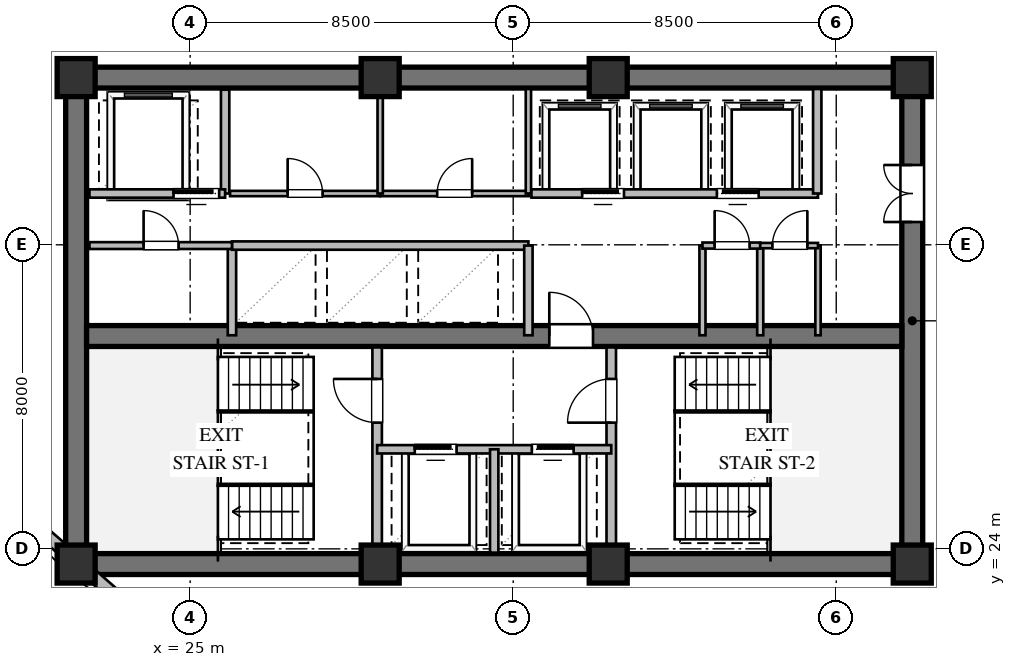
"""IFC4 building model, lengths in metres.
Left out: names, types, materials, properties, quantities, classifications, styles, units other than length and angle.
Written with IfcOpenShell. Run it as: python <this file> out.ifc"""

import sys

from ifc_helpers import new_model, si_unit, direction, frame, frame_2d, origin, origin_2d, place, context, subcontext, project, spatial, rectangle, extrude, element, fill, save


model = new_model("IFC4")
c1 = context("Model", 3, precision=1e-05, world=origin(), true_north=direction((0.0, 1.0)))
c2 = subcontext(c1, "Body", "Model", "MODEL_VIEW")
j1 = project(units=[si_unit("LENGTHUNIT", "METRE"), si_unit("PLANEANGLEUNIT", "RADIAN")], contexts=[c1])
p1 = place(None, origin())
s1 = spatial("IfcSite", under=j1, at=p1, CompositionType="ELEMENT")
p2 = place(p1, origin())
s2 = spatial("IfcBuilding", under=s1, at=p2, CompositionType="ELEMENT")
p3 = place(p2, frame((0.0, 0.0, 117.0)))
s3 = spatial("IfcBuildingStorey", under=s2, at=p3, CompositionType="ELEMENT", Elevation=117.0)
for number, where, z_axis, x_axis in (
    (1, (21.725, 23.6, 0.0), (0.0, 0.0, 1.0), (1.0, 0.0, 0.0)),
    (2, (21.725, 36.4, 0.0), (0.0, 0.0, 1.0), (1.0, 0.0, 0.0)),
):
    element("IfcWall", number, at=place(p3, frame(where, z_axis=z_axis, x_axis=x_axis)), inside=s3, PredefinedType="SHEAR", context=c2, shape_type="SweptSolid", body=[
        extrude(rectangle(XDim=22.55, YDim=0.55, at=frame_2d((11.275, 0.0))), origin(), (0.0, 0.0, 1.0), 3.36),
    ])
p4 = place(p3, frame((22.0, 23.875, 0.0), z_axis=(0.0, 0.0, 1.0), x_axis=(0.0, 1.0, 0.0)))
e3 = element("IfcWall", 3, at=p4, inside=s3, PredefinedType="SHEAR", context=c2, shape_type="SweptSolid", body=[
    extrude(rectangle(XDim=12.25, YDim=0.55, at=frame_2d((6.125, 0.0))), origin(), (0.0, 0.0, 1.0), 3.36),
])
p5 = place(p3, frame((44.0, 23.875, 0.0), z_axis=(0.0, 0.0, 1.0), x_axis=(0.0, 1.0, 0.0)))
e4 = element("IfcWall", 4, at=p5, inside=s3, PredefinedType="SHEAR", context=c2, shape_type="SweptSolid", body=[
    extrude(rectangle(XDim=12.25, YDim=0.55, at=frame_2d((6.125, 0.0))), origin(), (0.0, 0.0, 1.0), 3.36),
])
p6 = place(p5, frame((8.725, 0.0, 0.0)))
e5 = element("IfcOpeningElement", 5, at=p6, cuts=e4, PredefinedType="OPENING", context=c2, shape_type="SweptSolid", body=[
    extrude(rectangle(XDim=1.5, YDim=2.15, at=frame_2d((0.75, 1.075))), frame((0.0, 0.285, 0.0), z_axis=(0.0, -1.0, 0.0), x_axis=(1.0, 0.0, 0.0)), (0.0, 0.0, 1.0), 0.57),
])
p7 = place(p3, frame((22.275, 29.6, 0.0), z_axis=(0.0, 0.0, 1.0), x_axis=(1.0, 0.0, 0.0)))
e6 = element("IfcWall", 6, at=p7, inside=s3, PredefinedType="SHEAR", context=c2, shape_type="SweptSolid", body=[
    extrude(rectangle(XDim=21.45, YDim=0.55, at=frame_2d((10.725, 0.0))), origin(), (0.0, 0.0, 1.0), 3.36),
])
p8 = place(p7, frame((12.175, 0.0, 0.0)))
e7 = element("IfcOpeningElement", 7, at=p8, cuts=e6, PredefinedType="OPENING", context=c2, shape_type="SweptSolid", body=[
    extrude(rectangle(XDim=1.15, YDim=2.1, at=frame_2d((0.575, 1.05))), frame((0.0, 0.285, 0.0), z_axis=(0.0, -1.0, 0.0), x_axis=(1.0, 0.0, 0.0)), (0.0, 0.0, 1.0), 0.57),
])
for number, where, z_axis, x_axis in (
    (8, (22.0, 23.6, 0.0), (0.0, 0.0, 1.0), (1.0, 0.0, 0.0)),
    (9, (30.0, 23.6, 0.0), (0.0, 0.0, 1.0), (1.0, 0.0, 0.0)),
    (10, (36.0, 23.6, 0.0), (0.0, 0.0, 1.0), (1.0, 0.0, 0.0)),
    (11, (44.0, 23.6, 0.0), (0.0, 0.0, 1.0), (1.0, 0.0, 0.0)),
    (12, (44.0, 36.4, 0.0), (0.0, 0.0, 1.0), (1.0, 0.0, 0.0)),
    (13, (36.0, 36.4, 0.0), (0.0, 0.0, 1.0), (1.0, 0.0, 0.0)),
    (14, (30.0, 36.4, 0.0), (0.0, 0.0, 1.0), (1.0, 0.0, 0.0)),
    (15, (22.0, 36.4, 0.0), (0.0, 0.0, 1.0), (1.0, 0.0, 0.0)),
):
    element("IfcColumn", number, at=place(p3, frame(where, z_axis=z_axis, x_axis=x_axis)), inside=s3, PredefinedType="COLUMN", context=c2, shape_type="SweptSolid", body=[
        extrude(rectangle(XDim=1.0, YDim=1.0, at=origin_2d()), origin(), (0.0, 0.0, 1.0), 3.6),
    ])
p9 = place(p3, frame((24.225, 21.727, 0.0), z_axis=(0.0, 0.0, 1.0), x_axis=(-0.753105964003, 0.657899237713, 0.0)))
e16 = element("IfcWall", 16, at=p9, inside=s3, PredefinedType="STANDARD", context=c2, shape_type="SweptSolid", body=[
    extrude(rectangle(XDim=5.998, YDim=0.32, at=frame_2d((2.999, 0.0))), origin(), (0.0, 0.0, 1.0), 2.35),
])
p10 = place(p3, frame((29.92, 23.9, 0.0), z_axis=(0.0, 0.0, 1.0), x_axis=(0.0, 1.0, 0.0)))
e17 = element("IfcWall", 17, at=p10, inside=s3, PredefinedType="SOLIDWALL", context=c2, shape_type="SweptSolid", body=[
    extrude(rectangle(XDim=5.4, YDim=0.25, at=frame_2d((2.7, 0.0))), origin(), (0.0, 0.0, 1.0), 2.806),
])
p11 = place(p10, frame((3.421, 0.0, 0.0)))
e18 = element("IfcOpeningElement", 18, at=p11, cuts=e17, PredefinedType="OPENING", context=c2, shape_type="SweptSolid", body=[
    extrude(rectangle(XDim=1.15, YDim=2.1, at=frame_2d((0.575, 1.05))), frame((0.0, 0.135, 0.0), z_axis=(0.0, -1.0, 0.0), x_axis=(1.0, 0.0, 0.0)), (0.0, 0.0, 1.0), 0.27),
])
p12 = place(p3, frame((36.08, 23.9, 0.0), z_axis=(0.0, 0.0, 1.0), x_axis=(0.0, 1.0, 0.0)))
e19 = element("IfcWall", 19, at=p12, inside=s3, PredefinedType="SOLIDWALL", context=c2, shape_type="SweptSolid", body=[
    extrude(rectangle(XDim=5.4, YDim=0.25, at=frame_2d((2.7, 0.0))), origin(), (0.0, 0.0, 1.0), 3.36),
])
p13 = place(p12, frame((3.421, 0.0, 0.0)))
e20 = element("IfcOpeningElement", 20, at=p13, cuts=e19, PredefinedType="OPENING", context=c2, shape_type="SweptSolid", body=[
    extrude(rectangle(XDim=1.15, YDim=2.1, at=frame_2d((0.575, 1.05))), frame((0.0, 0.135, 0.0), z_axis=(0.0, -1.0, 0.0), x_axis=(1.0, 0.0, 0.0)), (0.0, 0.0, 1.0), 0.27),
])
p14 = place(p3, frame((29.92, 26.62, 0.0), z_axis=(0.0, 0.0, 1.0), x_axis=(1.0, 0.0, 0.0)))
e21 = element("IfcWall", 21, at=p14, inside=s3, PredefinedType="SOLIDWALL", context=c2, shape_type="SweptSolid", body=[
    extrude(rectangle(XDim=6.16, YDim=0.22, at=frame_2d((3.08, 0.0))), origin(), (0.0, 0.0, 1.0), 3.36),
])
p15 = place(p14, frame((0.99, 0.0, 0.0)))
e22 = element("IfcOpeningElement", 22, at=p15, cuts=e21, PredefinedType="OPENING", context=c2, shape_type="SweptSolid", body=[
    extrude(rectangle(XDim=1.1, YDim=2.1, at=frame_2d((0.55, 1.05))), frame((0.0, 0.12, 0.0), z_axis=(0.0, -1.0, 0.0), x_axis=(1.0, 0.0, 0.0)), (0.0, 0.0, 1.0), 0.24),
])
p16 = place(p14, frame((4.07, 0.0, 0.0)))
e23 = element("IfcOpeningElement", 23, at=p16, cuts=e21, PredefinedType="OPENING", context=c2, shape_type="SweptSolid", body=[
    extrude(rectangle(XDim=1.1, YDim=2.1, at=frame_2d((0.55, 1.05))), frame((0.0, 0.12, 0.0), z_axis=(0.0, -1.0, 0.0), x_axis=(1.0, 0.0, 0.0)), (0.0, 0.0, 1.0), 0.24),
])
p17 = place(p3, frame((33.0, 23.9, 0.0), z_axis=(0.0, 0.0, 1.0), x_axis=(0.0, 1.0, 0.0)))
e24 = element("IfcWall", 24, at=p17, inside=s3, PredefinedType="SOLIDWALL", context=c2, shape_type="SweptSolid", body=[
    extrude(rectangle(XDim=2.72, YDim=0.22, at=frame_2d((1.36, 0.0))), origin(), (0.0, 0.0, 1.0), 3.36),
])
p18 = place(p3, frame((25.92, 33.35, 0.0), z_axis=(0.0, 0.0, 1.0), x_axis=(0.0, 1.0, 0.0)))
e25 = element("IfcWall", 25, at=p18, inside=s3, PredefinedType="SOLIDWALL", context=c2, shape_type="SweptSolid", body=[
    extrude(rectangle(XDim=2.73, YDim=0.22, at=frame_2d((1.365, 0.0))), origin(), (0.0, 0.0, 1.0), 3.36),
])
p19 = place(p3, frame((22.35, 33.35, 0.0), z_axis=(0.0, 0.0, 1.0), x_axis=(1.0, 0.0, 0.0)))
e26 = element("IfcWall", 26, at=p19, inside=s3, PredefinedType="SOLIDWALL", context=c2, shape_type="SweptSolid", body=[
    extrude(rectangle(XDim=3.57, YDim=0.22, at=frame_2d((1.785, 0.0))), origin(), (0.0, 0.0, 1.0), 3.36),
])
p20 = place(p19, frame((2.213, 0.0, 0.0)))
e27 = element("IfcOpeningElement", 27, at=p20, cuts=e26, PredefinedType="OPENING", context=c2, shape_type="SweptSolid", body=[
    extrude(rectangle(XDim=1.2, YDim=2.1, at=frame_2d((0.6, 1.05))), frame((0.0, 0.12, 0.0), z_axis=(0.0, -1.0, 0.0), x_axis=(1.0, 0.0, 0.0)), (0.0, 0.0, 1.0), 0.24),
])
p21 = place(p3, frame((26.1, 29.62, 0.0), z_axis=(0.0, 0.0, 1.0), x_axis=(0.0, 1.0, 0.0)))
e28 = element("IfcWall", 28, at=p21, inside=s3, PredefinedType="SOLIDWALL", context=c2, shape_type="SweptSolid", body=[
    extrude(rectangle(XDim=2.36, YDim=0.22, at=frame_2d((1.18, 0.0))), origin(), (0.0, 0.0, 1.0), 3.36),
])
p22 = place(p3, frame((26.1, 31.98, 0.0), z_axis=(0.0, 0.0, 1.0), x_axis=(1.0, 0.0, 0.0)))
e29 = element("IfcWall", 29, at=p22, inside=s3, PredefinedType="SOLIDWALL", context=c2, shape_type="SweptSolid", body=[
    extrude(rectangle(XDim=7.8, YDim=0.22, at=frame_2d((3.9, 0.0))), origin(), (0.0, 0.0, 1.0), 3.36),
])
p23 = place(p3, frame((33.9, 29.62, 0.0), z_axis=(0.0, 0.0, 1.0), x_axis=(0.0, 1.0, 0.0)))
e30 = element("IfcWall", 30, at=p23, inside=s3, PredefinedType="SOLIDWALL", context=c2, shape_type="SweptSolid", body=[
    extrude(rectangle(XDim=2.36, YDim=0.22, at=frame_2d((1.18, 0.0))), origin(), (0.0, 0.0, 1.0), 3.36),
])
p24 = place(p3, frame((26.05, 33.35, 0.0), z_axis=(0.0, 0.0, 1.0), x_axis=(1.0, 0.0, 0.0)))
e31 = element("IfcWall", 31, at=p24, inside=s3, PredefinedType="PARTITIONING", context=c2, shape_type="SweptSolid", body=[
    extrude(rectangle(XDim=3.95, YDim=0.14, at=frame_2d((1.975, 0.0))), origin(), (0.0, 0.0, 1.0), 3.36),
])
p25 = place(p24, frame((1.515, 0.0, 0.0)))
e32 = element("IfcOpeningElement", 32, at=p25, cuts=e31, PredefinedType="OPENING", context=c2, shape_type="SweptSolid", body=[
    extrude(rectangle(XDim=0.92, YDim=2.1, at=frame_2d((0.46, 1.05))), frame((0.0, 0.08, 0.0), z_axis=(0.0, -1.0, 0.0), x_axis=(1.0, 0.0, 0.0)), (0.0, 0.0, 1.0), 0.16),
])
p26 = place(p3, frame((30.0, 33.35, 0.0), z_axis=(0.0, 0.0, 1.0), x_axis=(1.0, 0.0, 0.0)))
e33 = element("IfcWall", 33, at=p26, inside=s3, PredefinedType="PARTITIONING", context=c2, shape_type="SweptSolid", body=[
    extrude(rectangle(XDim=3.92, YDim=0.14, at=frame_2d((1.96, 0.0))), origin(), (0.0, 0.0, 1.0), 3.36),
])
p27 = place(p26, frame((1.5, 0.0, 0.0)))
e34 = element("IfcOpeningElement", 34, at=p27, cuts=e33, PredefinedType="OPENING", context=c2, shape_type="SweptSolid", body=[
    extrude(rectangle(XDim=0.92, YDim=2.1, at=frame_2d((0.46, 1.05))), frame((0.0, 0.08, 0.0), z_axis=(0.0, -1.0, 0.0), x_axis=(1.0, 0.0, 0.0)), (0.0, 0.0, 1.0), 0.16),
])
for number, where, z_axis, x_axis in (
    (35, (30.0, 33.35, 0.0), (0.0, 0.0, 1.0), (0.0, 1.0, 0.0)),
    (36, (33.9, 33.35, 0.0), (0.0, 0.0, 1.0), (0.0, 1.0, 0.0)),
):
    element("IfcWall", number, at=place(p3, frame(where, z_axis=z_axis, x_axis=x_axis)), inside=s3, PredefinedType="PARTITIONING", context=c2, shape_type="SweptSolid", body=[
        extrude(rectangle(XDim=2.75, YDim=0.14, at=frame_2d((1.375, 0.0))), origin(), (0.0, 0.0, 1.0), 3.36),
    ])
p28 = place(p3, frame((33.98, 33.35, 0.0), z_axis=(0.0, 0.0, 1.0), x_axis=(1.0, 0.0, 0.0)))
e37 = element("IfcWall", 37, at=p28, inside=s3, PredefinedType="SOLIDWALL", context=c2, shape_type="SweptSolid", body=[
    extrude(rectangle(XDim=7.54, YDim=0.22, at=frame_2d((3.77, 0.0))), origin(), (0.0, 0.0, 1.0), 3.36),
])
p29 = place(p28, frame((1.335, 0.0, 0.0)))
e38 = element("IfcOpeningElement", 38, at=p29, cuts=e37, PredefinedType="OPENING", context=c2, shape_type="SweptSolid", body=[
    extrude(rectangle(XDim=1.1, YDim=2.1, at=frame_2d((0.55, 1.05))), frame((0.0, 0.12, 0.0), z_axis=(0.0, -1.0, 0.0), x_axis=(1.0, 0.0, 0.0)), (0.0, 0.0, 1.0), 0.24),
])
p30 = place(p28, frame((4.879, 0.0, 0.0)))
e39 = element("IfcOpeningElement", 39, at=p30, cuts=e37, PredefinedType="OPENING", context=c2, shape_type="SweptSolid", body=[
    extrude(rectangle(XDim=1.1, YDim=2.1, at=frame_2d((0.55, 1.05))), frame((0.0, 0.12, 0.0), z_axis=(0.0, -1.0, 0.0), x_axis=(1.0, 0.0, 0.0)), (0.0, 0.0, 1.0), 0.24),
])
p31 = place(p3, frame((41.5, 33.35, 0.0), z_axis=(0.0, 0.0, 1.0), x_axis=(0.0, 1.0, 0.0)))
e40 = element("IfcWall", 40, at=p31, inside=s3, PredefinedType="SOLIDWALL", context=c2, shape_type="SweptSolid", body=[
    extrude(rectangle(XDim=2.75, YDim=0.22, at=frame_2d((1.375, 0.0))), origin(), (0.0, 0.0, 1.0), 3.36),
])
p32 = place(p3, frame((22.35, 31.98, 0.0), z_axis=(0.0, 0.0, 1.0), x_axis=(1.0, 0.0, 0.0)))
e41 = element("IfcWall", 41, at=p32, inside=s3, PredefinedType="PARTITIONING", context=c2, shape_type="SweptSolid", body=[
    extrude(rectangle(XDim=3.75, YDim=0.18, at=frame_2d((1.875, 0.0))), origin(), (0.0, 0.0, 1.0), 3.36),
])
p33 = place(p32, frame((1.425, 0.0, 0.0)))
e42 = element("IfcOpeningElement", 42, at=p33, cuts=e41, PredefinedType="OPENING", context=c2, shape_type="SweptSolid", body=[
    extrude(rectangle(XDim=0.92, YDim=2.1, at=frame_2d((0.46, 1.05))), frame((0.0, 0.1, 0.0), z_axis=(0.0, -1.0, 0.0), x_axis=(1.0, 0.0, 0.0)), (0.0, 0.0, 1.0), 0.2),
])
for number, where, z_axis, x_axis in (
    (43, (38.48, 29.62, 0.0), (0.0, 0.0, 1.0), (0.0, 1.0, 0.0)),
    (44, (40.0, 29.62, 0.0), (0.0, 0.0, 1.0), (0.0, 1.0, 0.0)),
):
    element("IfcWall", number, at=place(p3, frame(where, z_axis=z_axis, x_axis=x_axis)), inside=s3, PredefinedType="PLUMBINGWALL", context=c2, shape_type="SweptSolid", body=[
        extrude(rectangle(XDim=2.36, YDim=0.16, at=frame_2d((1.18, 0.0))), origin(), (0.0, 0.0, 1.0), 3.36),
    ])
p34 = place(p3, frame((41.52, 29.62, 0.0), z_axis=(0.0, 0.0, 1.0), x_axis=(0.0, 1.0, 0.0)))
e45 = element("IfcWall", 45, at=p34, inside=s3, PredefinedType="PARTITIONING", context=c2, shape_type="SweptSolid", body=[
    extrude(rectangle(XDim=2.36, YDim=0.14, at=frame_2d((1.18, 0.0))), origin(), (0.0, 0.0, 1.0), 3.36),
])
p35 = place(p3, frame((38.48, 31.98, 0.0), z_axis=(0.0, 0.0, 1.0), x_axis=(1.0, 0.0, 0.0)))
e46 = element("IfcWall", 46, at=p35, inside=s3, PredefinedType="PLUMBINGWALL", context=c2, shape_type="SweptSolid", body=[
    extrude(rectangle(XDim=1.52, YDim=0.16, at=frame_2d((0.76, 0.0))), origin(), (0.0, 0.0, 1.0), 3.36),
])
p36 = place(p35, frame((0.32, 0.0, 0.0)))
e47 = element("IfcOpeningElement", 47, at=p36, cuts=e46, PredefinedType="OPENING", context=c2, shape_type="SweptSolid", body=[
    extrude(rectangle(XDim=0.92, YDim=2.1, at=frame_2d((0.46, 1.05))), frame((0.0, 0.09, 0.0), z_axis=(0.0, -1.0, 0.0), x_axis=(1.0, 0.0, 0.0)), (0.0, 0.0, 1.0), 0.18),
])
p37 = place(p3, frame((40.0, 31.98, 0.0), z_axis=(0.0, 0.0, 1.0), x_axis=(1.0, 0.0, 0.0)))
e48 = element("IfcWall", 48, at=p37, inside=s3, PredefinedType="PARTITIONING", context=c2, shape_type="SweptSolid", body=[
    extrude(rectangle(XDim=1.52, YDim=0.14, at=frame_2d((0.76, 0.0))), origin(), (0.0, 0.0, 1.0), 3.36),
])
p38 = place(p37, frame((0.32, 0.0, 0.0)))
e49 = element("IfcOpeningElement", 49, at=p38, cuts=e48, PredefinedType="OPENING", context=c2, shape_type="SweptSolid", body=[
    extrude(rectangle(XDim=0.92, YDim=2.1, at=frame_2d((0.46, 1.05))), frame((0.0, 0.08, 0.0), z_axis=(0.0, -1.0, 0.0), x_axis=(1.0, 0.0, 0.0)), (0.0, 0.0, 1.0), 0.16),
])
p39 = place(p11, origin())
e50 = element("IfcDoor", 50, at=p39, inside=s3, OperationType="SINGLE_SWING_RIGHT", PredefinedType="DOOR", context=c2, shape_type="SweptSolid", body=[
    extrude(rectangle(XDim=1.15, YDim=2.1, at=frame_2d((0.575, 1.05))), frame((0.0, 0.025, 0.0), z_axis=(0.0, -1.0, 0.0), x_axis=(1.0, 0.0, 0.0)), (0.0, 0.0, 1.0), 0.05),
])
fill(e18, e50)
p40 = place(p13, origin())
e51 = element("IfcDoor", 51, at=p40, inside=s3, OperationType="SINGLE_SWING_LEFT", PredefinedType="DOOR", context=c2, shape_type="SweptSolid", body=[
    extrude(rectangle(XDim=1.15, YDim=2.1, at=frame_2d((0.575, 1.05))), frame((0.0, 0.025, 0.0), z_axis=(0.0, -1.0, 0.0), x_axis=(1.0, 0.0, 0.0)), (0.0, 0.0, 1.0), 0.05),
])
fill(e20, e51)
p41 = place(p15, origin())
e52 = element("IfcDoor", 52, at=p41, inside=s3, OperationType="SLIDING_TO_LEFT", PredefinedType="DOOR", context=c2, shape_type="SweptSolid", body=[
    extrude(rectangle(XDim=1.1, YDim=2.1, at=frame_2d((0.55, 1.05))), frame((0.0, 0.025, 0.0), z_axis=(0.0, -1.0, 0.0), x_axis=(1.0, 0.0, 0.0)), (0.0, 0.0, 1.0), 0.05),
])
fill(e22, e52)
p42 = place(p16, origin())
e53 = element("IfcDoor", 53, at=p42, inside=s3, OperationType="SLIDING_TO_RIGHT", PredefinedType="DOOR", context=c2, shape_type="SweptSolid", body=[
    extrude(rectangle(XDim=1.1, YDim=2.1, at=frame_2d((0.55, 1.05))), frame((0.0, 0.025, 0.0), z_axis=(0.0, -1.0, 0.0), x_axis=(1.0, 0.0, 0.0)), (0.0, 0.0, 1.0), 0.05),
])
fill(e23, e53)
p43 = place(p8, origin())
e54 = element("IfcDoor", 54, at=p43, inside=s3, OperationType="SINGLE_SWING_LEFT", PredefinedType="DOOR", context=c2, shape_type="SweptSolid", body=[
    extrude(rectangle(XDim=1.15, YDim=2.1, at=frame_2d((0.575, 1.05))), frame((0.0, 0.025, 0.0), z_axis=(0.0, -1.0, 0.0), x_axis=(1.0, 0.0, 0.0)), (0.0, 0.0, 1.0), 0.05),
])
fill(e7, e54)
p44 = place(p6, origin())
e55 = element("IfcDoor", 55, at=p44, inside=s3, OperationType="DOUBLE_DOOR_SINGLE_SWING", PredefinedType="DOOR", context=c2, shape_type="SweptSolid", body=[
    extrude(rectangle(XDim=1.5, YDim=2.15, at=frame_2d((0.75, 1.075))), frame((0.0, 0.025, 0.0), z_axis=(0.0, -1.0, 0.0), x_axis=(1.0, 0.0, 0.0)), (0.0, 0.0, 1.0), 0.05),
])
fill(e5, e55)
p45 = place(p20, origin())
e56 = element("IfcDoor", 56, at=p45, inside=s3, OperationType="SLIDING_TO_LEFT", PredefinedType="DOOR", context=c2, shape_type="SweptSolid", body=[
    extrude(rectangle(XDim=1.2, YDim=2.1, at=frame_2d((0.6, 1.05))), frame((0.0, 0.025, 0.0), z_axis=(0.0, -1.0, 0.0), x_axis=(1.0, 0.0, 0.0)), (0.0, 0.0, 1.0), 0.05),
])
fill(e27, e56)
p46 = place(p25, origin())
e57 = element("IfcDoor", 57, at=p46, inside=s3, OperationType="SINGLE_SWING_LEFT", PredefinedType="DOOR", context=c2, shape_type="SweptSolid", body=[
    extrude(rectangle(XDim=0.92, YDim=2.1, at=frame_2d((0.46, 1.05))), frame((0.0, 0.025, 0.0), z_axis=(0.0, -1.0, 0.0), x_axis=(1.0, 0.0, 0.0)), (0.0, 0.0, 1.0), 0.05),
])
fill(e32, e57)
p47 = place(p27, origin())
e58 = element("IfcDoor", 58, at=p47, inside=s3, OperationType="SINGLE_SWING_RIGHT", PredefinedType="DOOR", context=c2, shape_type="SweptSolid", body=[
    extrude(rectangle(XDim=0.92, YDim=2.1, at=frame_2d((0.46, 1.05))), frame((0.0, 0.025, 0.0), z_axis=(0.0, -1.0, 0.0), x_axis=(1.0, 0.0, 0.0)), (0.0, 0.0, 1.0), 0.05),
])
fill(e34, e58)
p48 = place(p29, origin())
e59 = element("IfcDoor", 59, at=p48, inside=s3, OperationType="SLIDING_TO_LEFT", PredefinedType="DOOR", context=c2, shape_type="SweptSolid", body=[
    extrude(rectangle(XDim=1.1, YDim=2.1, at=frame_2d((0.55, 1.05))), frame((0.0, 0.025, 0.0), z_axis=(0.0, -1.0, 0.0), x_axis=(1.0, 0.0, 0.0)), (0.0, 0.0, 1.0), 0.05),
])
fill(e38, e59)
p49 = place(p30, origin())
e60 = element("IfcDoor", 60, at=p49, inside=s3, OperationType="SLIDING_TO_RIGHT", PredefinedType="DOOR", context=c2, shape_type="SweptSolid", body=[
    extrude(rectangle(XDim=1.1, YDim=2.1, at=frame_2d((0.55, 1.05))), frame((0.0, 0.025, 0.0), z_axis=(0.0, -1.0, 0.0), x_axis=(1.0, 0.0, 0.0)), (0.0, 0.0, 1.0), 0.05),
])
fill(e39, e60)
p50 = place(p33, origin())
e61 = element("IfcDoor", 61, at=p50, inside=s3, OperationType="SINGLE_SWING_LEFT", PredefinedType="DOOR", context=c2, shape_type="SweptSolid", body=[
    extrude(rectangle(XDim=0.92, YDim=2.1, at=frame_2d((0.46, 1.05))), frame((0.0, 0.025, 0.0), z_axis=(0.0, -1.0, 0.0), x_axis=(1.0, 0.0, 0.0)), (0.0, 0.0, 1.0), 0.05),
])
fill(e42, e61)
p51 = place(p36, origin())
e62 = element("IfcDoor", 62, at=p51, inside=s3, OperationType="SINGLE_SWING_LEFT", PredefinedType="DOOR", context=c2, shape_type="SweptSolid", body=[
    extrude(rectangle(XDim=0.92, YDim=2.1, at=frame_2d((0.46, 1.05))), frame((0.0, 0.025, 0.0), z_axis=(0.0, -1.0, 0.0), x_axis=(1.0, 0.0, 0.0)), (0.0, 0.0, 1.0), 0.05),
])
fill(e47, e62)
p52 = place(p38, origin())
e63 = element("IfcDoor", 63, at=p52, inside=s3, OperationType="SINGLE_SWING_RIGHT", PredefinedType="DOOR", context=c2, shape_type="SweptSolid", body=[
    extrude(rectangle(XDim=0.92, YDim=2.1, at=frame_2d((0.46, 1.05))), frame((0.0, 0.025, 0.0), z_axis=(0.0, -1.0, 0.0), x_axis=(1.0, 0.0, 0.0)), (0.0, 0.0, 1.0), 0.05),
])
fill(e49, e63)
save(model, sys.argv[1])
